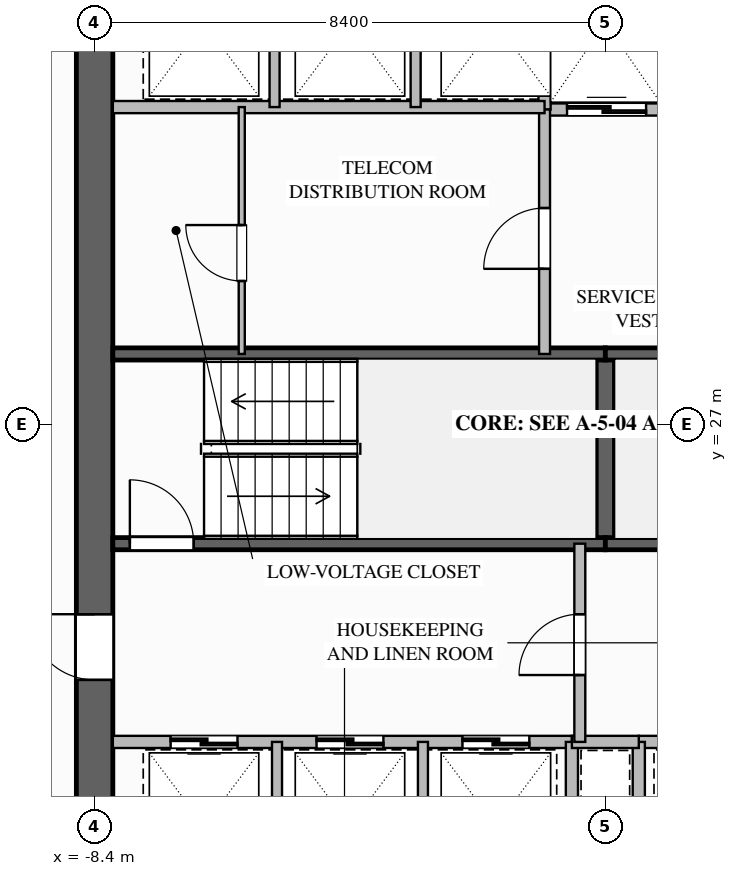
"""IFC4 building model, lengths in metres.
Left out: names, types, materials, properties, quantities, classifications, styles, units other than length and angle.
Written with IfcOpenShell. Run it as: python <this file> out.ifc"""

import sys

from ifc_helpers import new_model, si_unit, direction, frame, frame_2d, origin, place, context, subcontext, project, spatial, rectangle, extrude, element, fill, save


model = new_model("IFC4")
c1 = context("Model", 3, precision=1e-05, world=origin(), true_north=direction((0.0, 1.0)))
c2 = subcontext(c1, "Body", "Model", "MODEL_VIEW")
j1 = project(units=[si_unit("LENGTHUNIT", "METRE"), si_unit("PLANEANGLEUNIT", "RADIAN")], contexts=[c1])
p1 = place(None, origin())
s1 = spatial("IfcSite", under=j1, at=p1, CompositionType="ELEMENT")
p2 = place(p1, origin())
s2 = spatial("IfcBuilding", under=s1, at=p2, CompositionType="ELEMENT")
p3 = place(p2, frame((0.0, 0.0, 36.7)))
s3 = spatial("IfcBuildingStorey", under=s2, at=p3, CompositionType="ELEMENT", Elevation=36.7)
p4 = place(p3, frame((-8.4, 18.9, 0.0), z_axis=(0.0, 0.0, 1.0), x_axis=(0.0, 1.0, 0.0)))
e1 = element("IfcWall", 1, at=p4, inside=s3, PredefinedType="SHEAR", context=c2, shape_type="SweptSolid", body=[
    extrude(rectangle(XDim=16.2, YDim=0.6, at=frame_2d((8.1, 0.0))), origin(), (0.0, 0.0, 1.0), 3.5),
])
p5 = place(p4, frame((3.9, 0.0, 0.0)))
e2 = element("IfcOpeningElement", 2, at=p5, cuts=e1, PredefinedType="OPENING", context=c2, shape_type="SweptSolid", body=[
    extrude(rectangle(XDim=1.08, YDim=2.04, at=frame_2d((0.54, 1.02))), frame((0.0, 0.31, 0.0), z_axis=(0.0, -1.0, 0.0), x_axis=(1.0, 0.0, 0.0)), (0.0, 0.0, 1.0), 0.62),
])
p6 = place(p3, frame((0.0, 25.04, 0.0), z_axis=(0.0, 0.0, 1.0), x_axis=(0.0, 1.0, 0.0)))
e3 = element("IfcWall", 3, at=p6, inside=s3, PredefinedType="SOLIDWALL", context=c2, shape_type="SweptSolid", body=[
    extrude(rectangle(XDim=3.12, YDim=0.3, at=frame_2d((1.56, 0.0))), origin(), (0.0, 0.0, 1.0), 3.24),
])
p7 = place(p3, frame((-8.1, 25.04, 0.0), z_axis=(0.0, 0.0, 1.0), x_axis=(1.0, 0.0, 0.0)))
e4 = element("IfcWall", 4, at=p7, inside=s3, PredefinedType="SOLIDWALL", context=c2, shape_type="SweptSolid", body=[
    extrude(rectangle(XDim=8.1, YDim=0.2, at=frame_2d((4.05, 0.0))), origin(), (0.0, 0.0, 1.0), 3.24),
])
p8 = place(p7, frame((0.28, 0.0, 0.0)))
e5 = element("IfcOpeningElement", 5, at=p8, cuts=e4, PredefinedType="OPENING", context=c2, shape_type="SweptSolid", body=[
    extrude(rectangle(XDim=1.05, YDim=2.1, at=frame_2d((0.525, 1.05))), frame((0.0, 0.11, 0.0), z_axis=(0.0, -1.0, 0.0), x_axis=(1.0, 0.0, 0.0)), (0.0, 0.0, 1.0), 0.22),
])
for number, where, z_axis, x_axis in (
    (6, (-8.1, 28.16, 0.0), (0.0, 0.0, 1.0), (1.0, 0.0, 0.0)),
    (7, (0.0, 25.04, 0.0), (0.0, 0.0, 1.0), (1.0, 0.0, 0.0)),
):
    element("IfcWall", number, at=place(p3, frame(where, z_axis=z_axis, x_axis=x_axis)), inside=s3, PredefinedType="SOLIDWALL", context=c2, shape_type="SweptSolid", body=[
        extrude(rectangle(XDim=8.1, YDim=0.2, at=frame_2d((4.05, 0.0))), origin(), (0.0, 0.0, 1.0), 3.24),
    ])
p9 = place(p3, frame((8.1, 28.16, 0.0), z_axis=(0.0, 0.0, 1.0), x_axis=(-1.0, 0.0, 0.0)))
e8 = element("IfcWall", 8, at=p9, inside=s3, PredefinedType="SOLIDWALL", context=c2, shape_type="SweptSolid", body=[
    extrude(rectangle(XDim=8.1, YDim=0.2, at=frame_2d((4.05, 0.0))), origin(), (0.0, 0.0, 1.0), 3.24),
])
p10 = place(p9, frame((0.28, 0.0, 0.0)))
e9 = element("IfcOpeningElement", 9, at=p10, cuts=e8, PredefinedType="OPENING", context=c2, shape_type="SweptSolid", body=[
    extrude(rectangle(XDim=1.05, YDim=2.1, at=frame_2d((0.525, 1.05))), frame((0.0, 0.11, 0.0), z_axis=(0.0, -1.0, 0.0), x_axis=(1.0, 0.0, 0.0)), (0.0, 0.0, 1.0), 0.22),
])
p11 = place(p3, frame((-1.0, 32.18, 0.0), z_axis=(0.0, 0.0, 1.0), x_axis=(1.0, 0.0, 0.0)))
e10 = element("IfcWall", 10, at=p11, inside=s3, PredefinedType="SOLIDWALL", context=c2, shape_type="SweptSolid", body=[
    extrude(rectangle(XDim=4.1, YDim=0.2, at=frame_2d((2.05, 0.0))), origin(), (0.0, 0.0, 1.0), 3.24),
])
p12 = place(p11, frame((0.37, 0.0, 0.0)))
e11 = element("IfcOpeningElement", 11, at=p12, cuts=e10, PredefinedType="OPENING", context=c2, shape_type="SweptSolid", body=[
    extrude(rectangle(XDim=1.3, YDim=2.2, at=frame_2d((0.65, 1.1))), frame((0.0, 0.11, 0.0), z_axis=(0.0, -1.0, 0.0), x_axis=(1.0, 0.0, 0.0)), (0.0, 0.0, 1.0), 0.22),
])
p13 = place(p11, frame((2.33, 0.0, 0.0)))
e12 = element("IfcOpeningElement", 12, at=p13, cuts=e10, PredefinedType="OPENING", context=c2, shape_type="SweptSolid", body=[
    extrude(rectangle(XDim=1.3, YDim=2.2, at=frame_2d((0.65, 1.1))), frame((0.0, 0.11, 0.0), z_axis=(0.0, -1.0, 0.0), x_axis=(1.0, 0.0, 0.0)), (0.0, 0.0, 1.0), 0.22),
])
p14 = place(p3, frame((-1.0, 32.18, 0.0), z_axis=(0.0, 0.0, 1.0), x_axis=(0.0, 1.0, 0.0)))
e13 = element("IfcWall", 13, at=p14, inside=s3, PredefinedType="SOLIDWALL", context=c2, shape_type="SweptSolid", body=[
    extrude(rectangle(XDim=2.92, YDim=0.2, at=frame_2d((1.46, 0.0))), origin(), (0.0, 0.0, 1.0), 3.24),
])
p15 = place(p3, frame((-1.0, 28.16, 0.0), z_axis=(0.0, 0.0, 1.0), x_axis=(0.0, 1.0, 0.0)))
e14 = element("IfcWall", 14, at=p15, inside=s3, PredefinedType="SOLIDWALL", context=c2, shape_type="SweptSolid", body=[
    extrude(rectangle(XDim=4.02, YDim=0.18, at=frame_2d((2.01, 0.0))), origin(), (0.0, 0.0, 1.0), 3.24),
])
p16 = place(p15, frame((1.4, 0.0, 0.0)))
e15 = element("IfcOpeningElement", 15, at=p16, cuts=e14, PredefinedType="OPENING", context=c2, shape_type="SweptSolid", body=[
    extrude(rectangle(XDim=1.0, YDim=2.1, at=frame_2d((0.5, 1.05))), frame((0.0, 0.1, 0.0), z_axis=(0.0, -1.0, 0.0), x_axis=(1.0, 0.0, 0.0)), (0.0, 0.0, 1.0), 0.2),
])
p17 = place(p3, frame((-8.1, 32.22, 0.0), z_axis=(0.0, 0.0, 1.0), x_axis=(1.0, 0.0, 0.0)))
e16 = element("IfcWall", 16, at=p17, inside=s3, PredefinedType="SOLIDWALL", context=c2, shape_type="SweptSolid", body=[
    extrude(rectangle(XDim=7.1, YDim=0.2, at=frame_2d((3.55, 0.0))), origin(), (0.0, 0.0, 1.0), 3.24),
])
for number, where, z_axis, x_axis in (
    (17, (-5.44, 32.22, 0.0), (0.0, 0.0, 1.0), (0.0, 1.0, 0.0)),
    (18, (-3.12, 32.22, 0.0), (0.0, 0.0, 1.0), (0.0, 1.0, 0.0)),
):
    element("IfcWall", number, at=place(p3, frame(where, z_axis=z_axis, x_axis=x_axis)), inside=s3, PredefinedType="PARTITIONING", context=c2, shape_type="SweptSolid", body=[
        extrude(rectangle(XDim=2.88, YDim=0.165, at=frame_2d((1.44, 0.0))), origin(), (0.0, 0.0, 1.0), 3.24),
    ])
p18 = place(p3, frame((-5.98, 28.16, 0.0), z_axis=(0.0, 0.0, 1.0), x_axis=(0.0, 1.0, 0.0)))
e19 = element("IfcWall", 19, at=p18, inside=s3, PredefinedType="PARTITIONING", context=c2, shape_type="SweptSolid", body=[
    extrude(rectangle(XDim=4.06, YDim=0.1, at=frame_2d((2.03, 0.0))), origin(), (0.0, 0.0, 1.0), 3.24),
])
p19 = place(p18, frame((1.2, 0.0, 0.0)))
e20 = element("IfcOpeningElement", 20, at=p19, cuts=e19, PredefinedType="OPENING", context=c2, shape_type="SweptSolid", body=[
    extrude(rectangle(XDim=0.92, YDim=2.1, at=frame_2d((0.46, 1.05))), frame((0.0, 0.06, 0.0), z_axis=(0.0, -1.0, 0.0), x_axis=(1.0, 0.0, 0.0)), (0.0, 0.0, 1.0), 0.12),
])
p20 = place(p3, frame((-0.55, 21.78, 0.0), z_axis=(0.0, 0.0, 1.0), x_axis=(-1.0, 0.0, 0.0)))
e21 = element("IfcWall", 21, at=p20, inside=s3, PredefinedType="SOLIDWALL", context=c2, shape_type="SweptSolid", body=[
    extrude(rectangle(XDim=7.55, YDim=0.2, at=frame_2d((3.775, 0.0))), origin(), (0.0, 0.0, 1.0), 3.24),
])
p21 = place(p20, frame((5.5, 0.0, 0.0)))
e22 = element("IfcOpeningElement", 22, at=p21, cuts=e21, PredefinedType="OPENING", context=c2, shape_type="SweptSolid", body=[
    extrude(rectangle(XDim=1.1, YDim=2.2, at=frame_2d((0.55, 1.1))), frame((0.0, 0.11, 0.0), z_axis=(0.0, -1.0, 0.0), x_axis=(1.0, 0.0, 0.0)), (0.0, 0.0, 1.0), 0.22),
])
p22 = place(p20, frame((3.1, 0.0, 0.0)))
e23 = element("IfcOpeningElement", 23, at=p22, cuts=e21, PredefinedType="OPENING", context=c2, shape_type="SweptSolid", body=[
    extrude(rectangle(XDim=1.1, YDim=2.2, at=frame_2d((0.55, 1.1))), frame((0.0, 0.11, 0.0), z_axis=(0.0, -1.0, 0.0), x_axis=(1.0, 0.0, 0.0)), (0.0, 0.0, 1.0), 0.22),
])
p23 = place(p20, frame((0.7, 0.0, 0.0)))
e24 = element("IfcOpeningElement", 24, at=p23, cuts=e21, PredefinedType="OPENING", context=c2, shape_type="SweptSolid", body=[
    extrude(rectangle(XDim=1.1, YDim=2.2, at=frame_2d((0.55, 1.1))), frame((0.0, 0.11, 0.0), z_axis=(0.0, -1.0, 0.0), x_axis=(1.0, 0.0, 0.0)), (0.0, 0.0, 1.0), 0.22),
])
for number, where, z_axis, x_axis in (
    (25, (-5.4, 18.9, 0.0), (0.0, 0.0, 1.0), (0.0, 1.0, 0.0)),
    (26, (-3.0, 18.9, 0.0), (0.0, 0.0, 1.0), (0.0, 1.0, 0.0)),
):
    element("IfcWall", number, at=place(p3, frame(where, z_axis=z_axis, x_axis=x_axis)), inside=s3, PredefinedType="PARTITIONING", context=c2, shape_type="SweptSolid", body=[
        extrude(rectangle(XDim=2.88, YDim=0.165, at=frame_2d((1.44, 0.0))), origin(), (0.0, 0.0, 1.0), 3.24),
    ])
p24 = place(p3, frame((-0.55, 18.9, 0.0), z_axis=(0.0, 0.0, 1.0), x_axis=(0.0, 1.0, 0.0)))
e27 = element("IfcWall", 27, at=p24, inside=s3, PredefinedType="SOLIDWALL", context=c2, shape_type="SweptSolid", body=[
    extrude(rectangle(XDim=2.88, YDim=0.2, at=frame_2d((1.44, 0.0))), origin(), (0.0, 0.0, 1.0), 3.24),
])
p25 = place(p3, frame((8.1, 21.78, 0.0), z_axis=(0.0, 0.0, 1.0), x_axis=(-1.0, 0.0, 0.0)))
e28 = element("IfcWall", 28, at=p25, inside=s3, PredefinedType="SOLIDWALL", context=c2, shape_type="SweptSolid", body=[
    extrude(rectangle(XDim=7.55, YDim=0.2, at=frame_2d((3.775, 0.0))), origin(), (0.0, 0.0, 1.0), 3.24),
])
p26 = place(p3, frame((0.55, 18.9, 0.0), z_axis=(0.0, 0.0, 1.0), x_axis=(0.0, 1.0, 0.0)))
e29 = element("IfcWall", 29, at=p26, inside=s3, PredefinedType="SOLIDWALL", context=c2, shape_type="SweptSolid", body=[
    extrude(rectangle(XDim=2.88, YDim=0.2, at=frame_2d((1.44, 0.0))), origin(), (0.0, 0.0, 1.0), 3.24),
])
p27 = place(p3, frame((-0.55, 21.78, 0.0), z_axis=(0.0, 0.0, 1.0), x_axis=(1.0, 0.0, 0.0)))
e30 = element("IfcWall", 30, at=p27, inside=s3, PredefinedType="SOLIDWALL", context=c2, shape_type="SweptSolid", body=[
    extrude(rectangle(XDim=1.1, YDim=0.2, at=frame_2d((0.55, 0.0))), origin(), (0.0, 0.0, 1.0), 3.24),
])
p28 = place(p3, frame((-0.42, 21.78, 0.0), z_axis=(0.0, 0.0, 1.0), x_axis=(0.0, 1.0, 0.0)))
e31 = element("IfcWall", 31, at=p28, inside=s3, PredefinedType="SOLIDWALL", context=c2, shape_type="SweptSolid", body=[
    extrude(rectangle(XDim=3.26, YDim=0.18, at=frame_2d((1.63, 0.0))), origin(), (0.0, 0.0, 1.0), 3.24),
])
p29 = place(p28, frame((1.1, 0.0, 0.0)))
e32 = element("IfcOpeningElement", 32, at=p29, cuts=e31, PredefinedType="OPENING", context=c2, shape_type="SweptSolid", body=[
    extrude(rectangle(XDim=1.0, YDim=2.1, at=frame_2d((0.5, 1.05))), frame((0.0, 0.1, 0.0), z_axis=(0.0, -1.0, 0.0), x_axis=(1.0, 0.0, 0.0)), (0.0, 0.0, 1.0), 0.2),
])
p30 = place(p8, origin())
e33 = element("IfcDoor", 33, at=p30, inside=s3, OperationType="SINGLE_SWING_LEFT", PredefinedType="DOOR", context=c2, shape_type="SweptSolid", body=[
    extrude(rectangle(XDim=1.05, YDim=2.1, at=frame_2d((0.525, 1.05))), frame((0.0, 0.025, 0.0), z_axis=(0.0, -1.0, 0.0), x_axis=(1.0, 0.0, 0.0)), (0.0, 0.0, 1.0), 0.05),
])
fill(e5, e33)
p31 = place(p12, origin())
e34 = element("IfcDoor", 34, at=p31, inside=s3, OperationType="SLIDING_TO_LEFT", PredefinedType="DOOR", context=c2, shape_type="SweptSolid", body=[
    extrude(rectangle(XDim=1.3, YDim=2.2, at=frame_2d((0.65, 1.1))), frame((0.0, 0.025, 0.0), z_axis=(0.0, -1.0, 0.0), x_axis=(1.0, 0.0, 0.0)), (0.0, 0.0, 1.0), 0.05),
])
fill(e11, e34)
p32 = place(p16, origin())
e35 = element("IfcDoor", 35, at=p32, inside=s3, OperationType="SINGLE_SWING_LEFT", PredefinedType="DOOR", context=c2, shape_type="SweptSolid", body=[
    extrude(rectangle(XDim=1.0, YDim=2.1, at=frame_2d((0.5, 1.05))), frame((0.0, 0.025, 0.0), z_axis=(0.0, -1.0, 0.0), x_axis=(1.0, 0.0, 0.0)), (0.0, 0.0, 1.0), 0.05),
])
fill(e15, e35)
p33 = place(p19, origin())
e36 = element("IfcDoor", 36, at=p33, inside=s3, OperationType="SINGLE_SWING_RIGHT", PredefinedType="DOOR", context=c2, shape_type="SweptSolid", body=[
    extrude(rectangle(XDim=0.92, YDim=2.1, at=frame_2d((0.46, 1.05))), frame((0.0, 0.025, 0.0), z_axis=(0.0, -1.0, 0.0), x_axis=(1.0, 0.0, 0.0)), (0.0, 0.0, 1.0), 0.05),
])
fill(e20, e36)
p34 = place(p21, origin())
e37 = element("IfcDoor", 37, at=p34, inside=s3, OperationType="SLIDING_TO_LEFT", PredefinedType="DOOR", context=c2, shape_type="SweptSolid", body=[
    extrude(rectangle(XDim=1.1, YDim=2.2, at=frame_2d((0.55, 1.1))), frame((0.0, 0.025, 0.0), z_axis=(0.0, -1.0, 0.0), x_axis=(1.0, 0.0, 0.0)), (0.0, 0.0, 1.0), 0.05),
])
fill(e22, e37)
p35 = place(p22, origin())
e38 = element("IfcDoor", 38, at=p35, inside=s3, OperationType="SLIDING_TO_LEFT", PredefinedType="DOOR", context=c2, shape_type="SweptSolid", body=[
    extrude(rectangle(XDim=1.1, YDim=2.2, at=frame_2d((0.55, 1.1))), frame((0.0, 0.025, 0.0), z_axis=(0.0, -1.0, 0.0), x_axis=(1.0, 0.0, 0.0)), (0.0, 0.0, 1.0), 0.05),
])
fill(e23, e38)
p36 = place(p23, origin())
e39 = element("IfcDoor", 39, at=p36, inside=s3, OperationType="SLIDING_TO_LEFT", PredefinedType="DOOR", context=c2, shape_type="SweptSolid", body=[
    extrude(rectangle(XDim=1.1, YDim=2.2, at=frame_2d((0.55, 1.1))), frame((0.0, 0.025, 0.0), z_axis=(0.0, -1.0, 0.0), x_axis=(1.0, 0.0, 0.0)), (0.0, 0.0, 1.0), 0.05),
])
fill(e24, e39)
p37 = place(p29, origin())
e40 = element("IfcDoor", 40, at=p37, inside=s3, OperationType="SINGLE_SWING_LEFT", PredefinedType="DOOR", context=c2, shape_type="SweptSolid", body=[
    extrude(rectangle(XDim=1.0, YDim=2.1, at=frame_2d((0.5, 1.05))), frame((0.0, 0.025, 0.0), z_axis=(0.0, -1.0, 0.0), x_axis=(1.0, 0.0, 0.0)), (0.0, 0.0, 1.0), 0.05),
])
fill(e32, e40)
p38 = place(p5, origin())
e41 = element("IfcDoor", 41, at=p38, inside=s3, OperationType="SINGLE_SWING_RIGHT", PredefinedType="DOOR", context=c2, shape_type="SweptSolid", body=[
    extrude(rectangle(XDim=1.08, YDim=2.04, at=frame_2d((0.54, 1.02))), frame((0.0, 0.025, 0.0), z_axis=(0.0, -1.0, 0.0), x_axis=(1.0, 0.0, 0.0)), (0.0, 0.0, 1.0), 0.05),
])
fill(e2, e41)
save(model, sys.argv[1])
